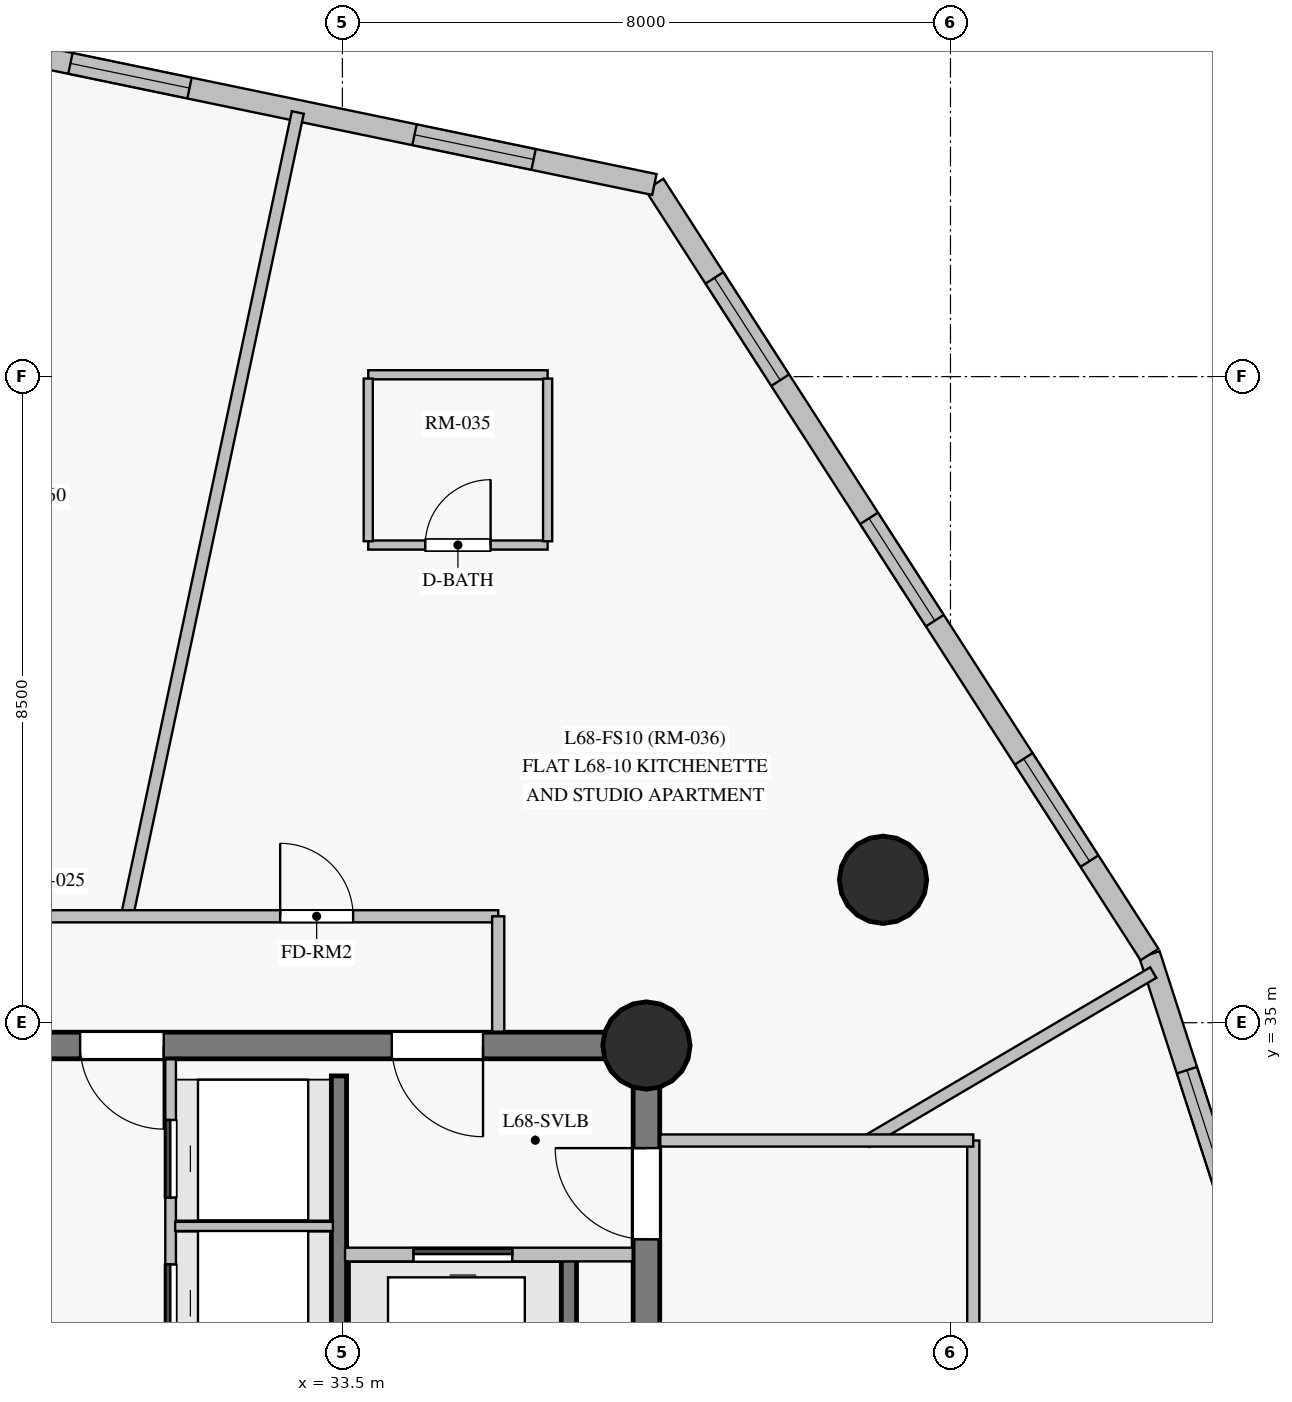
"""IFC4 building model, lengths in metres.
Left out: names, types, materials, properties, quantities, classifications, styles, units other than length and angle.
Written with IfcOpenShell. Run it as: python <this file> out.ifc"""

import sys

from ifc_helpers import new_model, si_unit, direction, frame, frame_2d, origin, origin_with_axes, origin_2d, place, context, subcontext, project, spatial, rectangle, circle, extrude, source, transform, mapped, element, fill, save


model = new_model("IFC4")
c1 = context("Model", 3, precision=1e-05, world=origin(), true_north=direction((0.0, 1.0)))
c2 = subcontext(c1, "Body", "Model", "MODEL_VIEW")
j1 = project(units=[si_unit("LENGTHUNIT", "METRE"), si_unit("PLANEANGLEUNIT", "RADIAN")], contexts=[c1])
p1 = place(None, origin())
s1 = spatial("IfcSite", under=j1, at=p1, CompositionType="ELEMENT")
p2 = place(p1, origin())
s2 = spatial("IfcBuilding", under=s1, at=p2, CompositionType="ELEMENT")
p3 = place(p2, frame((0.0, 0.0, 232.15)))
s3 = spatial("IfcBuildingStorey", under=s2, at=p3, CompositionType="ELEMENT", Elevation=232.15)
p4 = place(p3, frame((37.5, 18.3, 0.0), z_axis=(0.0, 0.0, 1.0), x_axis=(0.0, 1.0, 0.0)))
e1 = element("IfcWall", 1, at=p4, inside=s3, PredefinedType="SHEAR", context=c2, shape_type="SweptSolid", body=[
    extrude(rectangle(XDim=16.4, YDim=0.35, at=frame_2d((8.2, 0.0))), origin(), (0.0, 0.0, 1.0), 2.85),
])
p5 = place(p4, frame((13.85, 0.0, 0.0)))
e2 = element("IfcOpeningElement", 2, at=p5, cuts=e1, PredefinedType="OPENING", context=c2, shape_type="SweptSolid", body=[
    extrude(rectangle(XDim=1.2, YDim=2.15, at=frame_2d((0.6, 1.075))), frame((0.0, 0.185, 0.0), z_axis=(0.0, -1.0, 0.0), x_axis=(1.0, 0.0, 0.0)), (0.0, 0.0, 1.0), 0.37),
])
p6 = place(p3, frame((37.5, 34.7, 0.0), z_axis=(0.0, 0.0, 1.0), x_axis=(-1.0, 0.0, 0.0)))
e3 = element("IfcWall", 3, at=p6, inside=s3, PredefinedType="SHEAR", context=c2, shape_type="SweptSolid", body=[
    extrude(rectangle(XDim=10.95, YDim=0.35, at=frame_2d((5.475, 0.0))), origin(), (0.0, 0.0, 1.0), 2.85),
])
p7 = place(p6, frame((2.15, 0.0, 0.0)))
e4 = element("IfcOpeningElement", 4, at=p7, cuts=e3, PredefinedType="OPENING", context=c2, shape_type="SweptSolid", body=[
    extrude(rectangle(XDim=1.2, YDim=2.15, at=frame_2d((0.6, 1.075))), frame((0.0, 0.185, 0.0), z_axis=(0.0, -1.0, 0.0), x_axis=(1.0, 0.0, 0.0)), (0.0, 0.0, 1.0), 0.37),
])
p8 = place(p6, frame((6.35, 0.0, 0.0)))
e5 = element("IfcOpeningElement", 5, at=p8, cuts=e3, PredefinedType="OPENING", context=c2, shape_type="SweptSolid", body=[
    extrude(rectangle(XDim=1.1, YDim=2.15, at=frame_2d((0.55, 1.075))), frame((0.0, 0.185, 0.0), z_axis=(0.0, -1.0, 0.0), x_axis=(1.0, 0.0, 0.0)), (0.0, 0.0, 1.0), 0.37),
])
m1 = source(origin_with_axes(), c2, "Body", "SweptSolid", [
    extrude(circle(Radius=0.575, at=origin_2d()), origin(), (0.0, 0.0, 1.0), 3.05),
])
for number, where, z_axis, x_axis in (
    (6, (37.5, 34.7, 0.0), (0.0, 0.0, 1.0), (1.0, 0.0, 0.0)),
    (7, (40.613, 36.88, 0.0), (0.0, 0.0, 1.0), (1.0, 0.0, 0.0)),
):
    element("IfcColumn", number, at=place(p3, frame(where, z_axis=z_axis, x_axis=x_axis)), inside=s3, PredefinedType="COLUMN", context=c2, shape_type="MappedRepresentation", body=[
        mapped(m1, transform((0.0, 0.0, 0.0), scale=1.0)),
    ])
p9 = place(p3, frame((46.664, 28.027, 0.0), z_axis=(0.0, 0.0, 1.0), x_axis=(-0.307705547062, 0.951481632144, 0.0)))
e8 = element("IfcWall", 8, at=p9, inside=s3, PredefinedType="SOLIDWALL", context=c2, shape_type="SweptSolid", body=[
    extrude(rectangle(XDim=8.271, YDim=0.28, at=frame_2d((4.136, 0.0))), origin(), (0.0, 0.0, 1.0), 2.85),
])
p10 = place(p9, frame((1.41, 0.0, 0.85)))
e9 = element("IfcOpeningElement", 9, at=p10, cuts=e8, PredefinedType="OPENING", context=c2, shape_type="SweptSolid", body=[
    extrude(rectangle(XDim=1.6, YDim=1.6, at=frame_2d((0.8, 0.8))), frame((0.0, 0.15, 0.0), z_axis=(0.0, -1.0, 0.0), x_axis=(1.0, 0.0, 0.0)), (0.0, 0.0, 1.0), 0.3),
])
p11 = place(p9, frame((5.072, 0.0, 0.85)))
e10 = element("IfcOpeningElement", 10, at=p11, cuts=e8, PredefinedType="OPENING", context=c2, shape_type="SweptSolid", body=[
    extrude(rectangle(XDim=1.6, YDim=1.6, at=frame_2d((0.8, 0.8))), frame((0.0, 0.15, 0.0), z_axis=(0.0, -1.0, 0.0), x_axis=(1.0, 0.0, 0.0)), (0.0, 0.0, 1.0), 0.3),
])
p12 = place(p3, frame((44.118, 35.897, 0.0), z_axis=(0.0, 0.0, 1.0), x_axis=(-0.540866189817, 0.841108652145, 0.0)))
e11 = element("IfcWall", 11, at=p12, inside=s3, PredefinedType="SOLIDWALL", context=c2, shape_type="SweptSolid", body=[
    extrude(rectangle(XDim=12.043, YDim=0.28, at=frame_2d((6.022, 0.0))), origin(), (0.0, 0.0, 1.0), 2.85),
])
p13 = place(p12, frame((1.461, 0.0, 0.85)))
e12 = element("IfcOpeningElement", 12, at=p13, cuts=e11, PredefinedType="OPENING", context=c2, shape_type="SweptSolid", body=[
    extrude(rectangle(XDim=1.6, YDim=1.6, at=frame_2d((0.8, 0.8))), frame((0.0, 0.15, 0.0), z_axis=(0.0, -1.0, 0.0), x_axis=(1.0, 0.0, 0.0)), (0.0, 0.0, 1.0), 0.3),
])
p14 = place(p12, frame((5.222, 0.0, 0.85)))
e13 = element("IfcOpeningElement", 13, at=p14, cuts=e11, PredefinedType="OPENING", context=c2, shape_type="SweptSolid", body=[
    extrude(rectangle(XDim=1.6, YDim=1.6, at=frame_2d((0.8, 0.8))), frame((0.0, 0.15, 0.0), z_axis=(0.0, -1.0, 0.0), x_axis=(1.0, 0.0, 0.0)), (0.0, 0.0, 1.0), 0.3),
])
p15 = place(p12, frame((8.983, 0.0, 0.85)))
e14 = element("IfcOpeningElement", 14, at=p15, cuts=e11, PredefinedType="OPENING", context=c2, shape_type="SweptSolid", body=[
    extrude(rectangle(XDim=1.6, YDim=1.6, at=frame_2d((0.8, 0.8))), frame((0.0, 0.15, 0.0), z_axis=(0.0, -1.0, 0.0), x_axis=(1.0, 0.0, 0.0)), (0.0, 0.0, 1.0), 0.3),
])
p16 = place(p3, frame((37.604, 46.027, 0.0), z_axis=(0.0, 0.0, 1.0), x_axis=(-0.979153110394, 0.203123574224, 0.0)))
e15 = element("IfcWall", 15, at=p16, inside=s3, PredefinedType="SOLIDWALL", context=c2, shape_type="SweptSolid", body=[
    extrude(rectangle(XDim=9.367, YDim=0.28, at=frame_2d((4.683, 0.0))), origin(), (0.0, 0.0, 1.0), 2.85),
])
p17 = place(p16, frame((1.623, 0.0, 0.85)))
e16 = element("IfcOpeningElement", 16, at=p17, cuts=e15, PredefinedType="OPENING", context=c2, shape_type="SweptSolid", body=[
    extrude(rectangle(XDim=1.6, YDim=1.6, at=frame_2d((0.8, 0.8))), frame((0.0, 0.15, 0.0), z_axis=(0.0, -1.0, 0.0), x_axis=(1.0, 0.0, 0.0)), (0.0, 0.0, 1.0), 0.3),
])
p18 = place(p16, frame((6.246, 0.0, 0.85)))
e17 = element("IfcOpeningElement", 17, at=p18, cuts=e15, PredefinedType="OPENING", context=c2, shape_type="SweptSolid", body=[
    extrude(rectangle(XDim=1.6, YDim=1.6, at=frame_2d((0.8, 0.8))), frame((0.0, 0.15, 0.0), z_axis=(0.0, -1.0, 0.0), x_axis=(1.0, 0.0, 0.0)), (0.0, 0.0, 1.0), 0.3),
])
p19 = place(p3, frame((33.455, 18.7, 0.0), z_axis=(0.0, 0.0, 1.0), x_axis=(0.0, 1.0, 0.0)))
e18 = element("IfcWall", 18, at=p19, inside=s3, PredefinedType="SHEAR", context=c2, shape_type="SweptSolid", body=[
    extrude(rectangle(XDim=15.6, YDim=0.2, at=frame_2d((7.8, 0.0))), origin(), (0.0, 0.0, 1.0), 2.85),
])
p20 = place(p19, frame((2.75, 0.0, 0.0)))
e19 = element("IfcOpeningElement", 19, at=p20, cuts=e18, PredefinedType="OPENING", context=c2, shape_type="SweptSolid", body=[
    extrude(rectangle(XDim=1.15, YDim=2.15, at=frame_2d((0.575, 1.075))), frame((0.0, 0.11, 0.0), z_axis=(0.0, -1.0, 0.0), x_axis=(1.0, 0.0, 0.0)), (0.0, 0.0, 1.0), 0.22),
])
p21 = place(p19, frame((0.55, 0.0, 0.0)))
e20 = element("IfcOpeningElement", 20, at=p21, cuts=e18, PredefinedType="OPENING", context=c2, shape_type="SweptSolid", body=[
    extrude(rectangle(XDim=0.94, YDim=2.1, at=frame_2d((0.47, 1.05))), frame((0.0, 0.11, 0.0), z_axis=(0.0, -1.0, 0.0), x_axis=(1.0, 0.0, 0.0)), (0.0, 0.0, 1.0), 0.22),
])
p22 = place(p3, frame((36.48, 29.02, 0.0), z_axis=(0.0, 0.0, 1.0), x_axis=(0.0, 1.0, 0.0)))
e21 = element("IfcWall", 21, at=p22, inside=s3, PredefinedType="SHEAR", context=c2, shape_type="SweptSolid", body=[
    extrude(rectangle(XDim=2.86, YDim=0.2, at=frame_2d((1.43, 0.0))), origin(), (0.0, 0.0, 1.0), 2.85),
])
p23 = place(p3, frame((41.8, 33.45, 0.0), z_axis=(0.0, 0.0, 1.0), x_axis=(0.0, -1.0, 0.0)))
e22 = element("IfcWall", 22, at=p23, inside=s3, PredefinedType="PARTITIONING", context=c2, shape_type="SweptSolid", body=[
    extrude(rectangle(XDim=17.433, YDim=0.16, at=frame_2d((8.717, 0.0))), origin(), (0.0, 0.0, 1.0), 2.3),
])
p24 = place(p23, frame((10.75, 0.0, 0.0)))
e23 = element("IfcOpeningElement", 23, at=p24, cuts=e22, PredefinedType="OPENING", context=c2, shape_type="SweptSolid", body=[
    extrude(rectangle(XDim=0.96, YDim=2.15, at=frame_2d((0.48, 1.075))), frame((0.0, 0.09, 0.0), z_axis=(0.0, -1.0, 0.0), x_axis=(1.0, 0.0, 0.0)), (0.0, 0.0, 1.0), 0.18),
])
p25 = place(p23, frame((7.77, 0.0, 0.0)))
e24 = element("IfcOpeningElement", 24, at=p25, cuts=e22, PredefinedType="OPENING", context=c2, shape_type="SweptSolid", body=[
    extrude(rectangle(XDim=0.96, YDim=2.15, at=frame_2d((0.48, 1.075))), frame((0.0, 0.09, 0.0), z_axis=(0.0, -1.0, 0.0), x_axis=(1.0, 0.0, 0.0)), (0.0, 0.0, 1.0), 0.18),
])
p26 = place(p23, frame((6.333, 0.0, 0.0)))
e25 = element("IfcOpeningElement", 25, at=p26, cuts=e22, PredefinedType="OPENING", context=c2, shape_type="SweptSolid", body=[
    extrude(rectangle(XDim=0.96, YDim=2.15, at=frame_2d((0.48, 1.075))), frame((0.0, 0.09, 0.0), z_axis=(0.0, -1.0, 0.0), x_axis=(1.0, 0.0, 0.0)), (0.0, 0.0, 1.0), 0.18),
])
p27 = place(p23, frame((3.231, 0.0, 0.0)))
e26 = element("IfcOpeningElement", 26, at=p27, cuts=e22, PredefinedType="OPENING", context=c2, shape_type="SweptSolid", body=[
    extrude(rectangle(XDim=0.86, YDim=2.04, at=frame_2d((0.43, 1.02))), frame((0.0, 0.09, 0.0), z_axis=(0.0, -1.0, 0.0), x_axis=(1.0, 0.0, 0.0)), (0.0, 0.0, 1.0), 0.18),
])
p28 = place(p3, frame((30.659, 36.371, 0.0), z_axis=(0.0, 0.0, 1.0), x_axis=(0.207907775763, 0.978148432896, 0.0)))
e27 = element("IfcWall", 27, at=p28, inside=s3, PredefinedType="PARTITIONING", context=c2, shape_type="SweptSolid", body=[
    extrude(rectangle(XDim=10.841, YDim=0.16, at=frame_2d((5.42, 0.0))), origin(), (0.0, 0.0, 1.0), 2.85),
])
p29 = place(p3, frame((28.6, 36.4, 0.0), z_axis=(0.0, 0.0, 1.0), x_axis=(1.0, 0.0, 0.0)))
e28 = element("IfcWall", 28, at=p29, inside=s3, PredefinedType="PARTITIONING", context=c2, shape_type="SweptSolid", body=[
    extrude(rectangle(XDim=6.95, YDim=0.16, at=frame_2d((3.475, 0.0))), origin(), (0.0, 0.0, 1.0), 2.45),
])
p30 = place(p29, frame((4.081, 0.0, 0.0)))
e29 = element("IfcOpeningElement", 29, at=p30, cuts=e28, PredefinedType="OPENING", context=c2, shape_type="SweptSolid", body=[
    extrude(rectangle(XDim=0.96, YDim=2.15, at=frame_2d((0.48, 1.075))), frame((0.0, 0.09, 0.0), z_axis=(0.0, -1.0, 0.0), x_axis=(1.0, 0.0, 0.0)), (0.0, 0.0, 1.0), 0.18),
])
p31 = place(p3, frame((40.391, 33.435, 0.0), z_axis=(0.0, 0.0, 1.0), x_axis=(0.861637645298, 0.507523958257, 0.0)))
e30 = element("IfcWall", 30, at=p31, inside=s3, PredefinedType="PARTITIONING", context=c2, shape_type="SweptSolid", body=[
    extrude(rectangle(XDim=4.383, YDim=0.16, at=frame_2d((2.191, 0.0))), origin(), (0.0, 0.0, 1.0), 2.85),
])
p32 = place(p3, frame((37.682, 33.45, 0.0), z_axis=(0.0, 0.0, 1.0), x_axis=(1.0, 0.0, 0.0)))
e31 = element("IfcWall", 31, at=p32, inside=s3, PredefinedType="PARTITIONING", context=c2, shape_type="SweptSolid", body=[
    extrude(rectangle(XDim=4.118, YDim=0.16, at=frame_2d((2.059, 0.0))), origin(), (0.0, 0.0, 1.0), 2.85),
])
p33 = place(p3, frame((31.24, 30.45, 0.0), z_axis=(0.0, 0.0, 1.0), x_axis=(0.0, 1.0, 0.0)))
e32 = element("IfcWall", 32, at=p33, inside=s3, PredefinedType="PARTITIONING", context=c2, shape_type="SweptSolid", body=[
    extrude(rectangle(XDim=4.068, YDim=0.14, at=frame_2d((2.034, 0.0))), origin(), (0.0, 0.0, 1.0), 2.85),
])
p34 = place(p33, frame((0.35, 0.0, 0.0)))
e33 = element("IfcOpeningElement", 33, at=p34, cuts=e32, PredefinedType="OPENING", context=c2, shape_type="SweptSolid", body=[
    extrude(rectangle(XDim=1.02, YDim=2.15, at=frame_2d((0.51, 1.075))), frame((0.0, 0.08, 0.0), z_axis=(0.0, -1.0, 0.0), x_axis=(1.0, 0.0, 0.0)), (0.0, 0.0, 1.0), 0.16),
])
p35 = place(p33, frame((2.25, 0.0, 0.0)))
e34 = element("IfcOpeningElement", 34, at=p35, cuts=e32, PredefinedType="OPENING", context=c2, shape_type="SweptSolid", body=[
    extrude(rectangle(XDim=1.02, YDim=2.15, at=frame_2d((0.51, 1.075))), frame((0.0, 0.08, 0.0), z_axis=(0.0, -1.0, 0.0), x_axis=(1.0, 0.0, 0.0)), (0.0, 0.0, 1.0), 0.16),
])
p36 = place(p3, frame((33.535, 31.95, 0.0), z_axis=(0.0, 0.0, 1.0), x_axis=(1.0, 0.0, 0.0)))
e35 = element("IfcWall", 35, at=p36, inside=s3, PredefinedType="PARTITIONING", context=c2, shape_type="SweptSolid", body=[
    extrude(rectangle(XDim=3.784, YDim=0.18, at=frame_2d((1.892, 0.0))), origin(), (0.0, 0.0, 1.0), 2.85),
])
p37 = place(p36, frame((0.9, 0.0, 0.0)))
e36 = element("IfcOpeningElement", 36, at=p37, cuts=e35, PredefinedType="OPENING", context=c2, shape_type="SweptSolid", body=[
    extrude(rectangle(XDim=1.3, YDim=2.2, at=frame_2d((0.65, 1.1))), frame((0.0, 0.1, 0.0), z_axis=(0.0, -1.0, 0.0), x_axis=(1.0, 0.0, 0.0)), (0.0, 0.0, 1.0), 0.2),
])
p38 = place(p3, frame((33.84, 41.284, 0.0), z_axis=(0.0, 0.0, 1.0), x_axis=(1.0, 0.0, 0.0)))
e37 = element("IfcWall", 37, at=p38, inside=s3, PredefinedType="PARTITIONING", context=c2, shape_type="SweptSolid", body=[
    extrude(rectangle(XDim=2.36, YDim=0.12, at=frame_2d((1.18, 0.0))), origin(), (0.0, 0.0, 1.0), 2.85),
])
p39 = place(p38, frame((0.75, 0.0, 0.0)))
e38 = element("IfcOpeningElement", 38, at=p39, cuts=e37, PredefinedType="OPENING", context=c2, shape_type="SweptSolid", body=[
    extrude(rectangle(XDim=0.86, YDim=2.1, at=frame_2d((0.43, 1.05))), frame((0.0, 0.07, 0.0), z_axis=(0.0, -1.0, 0.0), x_axis=(1.0, 0.0, 0.0)), (0.0, 0.0, 1.0), 0.14),
])
p40 = place(p3, frame((36.2, 43.524, 0.0), z_axis=(0.0, 0.0, 1.0), x_axis=(-1.0, 0.0, 0.0)))
e39 = element("IfcWall", 39, at=p40, inside=s3, PredefinedType="PARTITIONING", context=c2, shape_type="SweptSolid", body=[
    extrude(rectangle(XDim=2.36, YDim=0.12, at=frame_2d((1.18, 0.0))), origin(), (0.0, 0.0, 1.0), 2.85),
])
for number, where, z_axis, x_axis in (
    (40, (36.2, 41.334, 0.0), (0.0, 0.0, 1.0), (0.0, 1.0, 0.0)),
    (41, (33.84, 43.474, 0.0), (0.0, 0.0, 1.0), (0.0, -1.0, 0.0)),
):
    element("IfcWall", number, at=place(p3, frame(where, z_axis=z_axis, x_axis=x_axis)), inside=s3, PredefinedType="PARTITIONING", context=c2, shape_type="SweptSolid", body=[
        extrude(rectangle(XDim=2.14, YDim=0.12, at=frame_2d((1.07, 0.0))), origin(), (0.0, 0.0, 1.0), 2.85),
    ])
p41 = place(p3, frame((31.3, 32.32, 0.0), z_axis=(0.0, 0.0, 1.0), x_axis=(1.0, 0.0, 0.0)))
e42 = element("IfcWall", 42, at=p41, inside=s3, PredefinedType="PARTITIONING", context=c2, shape_type="SweptSolid", body=[
    extrude(rectangle(XDim=2.075, YDim=0.12, at=frame_2d((1.038, 0.0))), origin(), (0.0, 0.0, 1.0), 2.85),
])
p42 = place(p3, frame((35.55, 36.4, 0.0), z_axis=(0.0, 0.0, 1.0), x_axis=(0.0, -1.0, 0.0)))
e43 = element("IfcWall", 43, at=p42, inside=s3, PredefinedType="PARTITIONING", context=c2, shape_type="SweptSolid", body=[
    extrude(rectangle(XDim=1.518, YDim=0.16, at=frame_2d((0.759, 0.0))), origin(), (0.0, 0.0, 1.0), 2.85),
])
m2 = source(origin_with_axes(), c2, "Body", "SweptSolid", [
    extrude(rectangle(XDim=1.6, YDim=1.6, at=frame_2d((0.8, 0.8))), frame((0.0, 0.03, 0.0), z_axis=(0.0, -1.0, 0.0), x_axis=(1.0, 0.0, 0.0)), (0.0, 0.0, 1.0), 0.06),
])
p43 = place(p11, origin())
e44 = element("IfcWindow", 44, at=p43, inside=s3, PartitioningType="SINGLE_PANEL", PredefinedType="WINDOW", context=c2, shape_type="MappedRepresentation", body=[
    mapped(m2, transform((0.0, 0.0, 0.0), scale=1.0)),
])
fill(e10, e44)
p44 = place(p13, origin())
e45 = element("IfcWindow", 45, at=p44, inside=s3, PartitioningType="SINGLE_PANEL", PredefinedType="WINDOW", context=c2, shape_type="MappedRepresentation", body=[
    mapped(m2, transform((0.0, 0.0, 0.0), scale=1.0)),
])
fill(e12, e45)
p45 = place(p14, origin())
e46 = element("IfcWindow", 46, at=p45, inside=s3, PartitioningType="SINGLE_PANEL", PredefinedType="WINDOW", context=c2, shape_type="MappedRepresentation", body=[
    mapped(m2, transform((0.0, 0.0, 0.0), scale=1.0)),
])
fill(e13, e46)
p46 = place(p15, origin())
e47 = element("IfcWindow", 47, at=p46, inside=s3, PartitioningType="SINGLE_PANEL", PredefinedType="WINDOW", context=c2, shape_type="MappedRepresentation", body=[
    mapped(m2, transform((0.0, 0.0, 0.0), scale=1.0)),
])
fill(e14, e47)
p47 = place(p17, origin())
e48 = element("IfcWindow", 48, at=p47, inside=s3, PartitioningType="SINGLE_PANEL", PredefinedType="WINDOW", context=c2, shape_type="MappedRepresentation", body=[
    mapped(m2, transform((0.0, 0.0, 0.0), scale=1.0)),
])
fill(e16, e48)
p48 = place(p18, origin())
e49 = element("IfcWindow", 49, at=p48, inside=s3, PartitioningType="SINGLE_PANEL", PredefinedType="WINDOW", context=c2, shape_type="MappedRepresentation", body=[
    mapped(m2, transform((0.0, 0.0, 0.0), scale=1.0)),
])
fill(e17, e49)
m3 = source(origin_with_axes(), c2, "Body", "SweptSolid", [
    extrude(rectangle(XDim=1.2, YDim=2.15, at=frame_2d((0.6, 1.075))), frame((0.0, 0.025, 0.0), z_axis=(0.0, -1.0, 0.0), x_axis=(1.0, 0.0, 0.0)), (0.0, 0.0, 1.0), 0.05),
])
p49 = place(p5, origin())
e50 = element("IfcDoor", 50, at=p49, inside=s3, OperationType="SINGLE_SWING_RIGHT", PredefinedType="DOOR", context=c2, shape_type="MappedRepresentation", body=[
    mapped(m3, transform((0.0, 0.0, 0.0), scale=1.0)),
])
fill(e2, e50)
p50 = place(p7, origin())
e51 = element("IfcDoor", 51, at=p50, inside=s3, OperationType="SINGLE_SWING_LEFT", PredefinedType="DOOR", context=c2, shape_type="MappedRepresentation", body=[
    mapped(m3, transform((0.0, 0.0, 0.0), scale=1.0)),
])
fill(e4, e51)
m4 = source(origin_with_axes(), c2, "Body", "SweptSolid", [
    extrude(rectangle(XDim=1.3, YDim=2.2, at=frame_2d((0.65, 1.1))), frame((0.0, 0.025, 0.0), z_axis=(0.0, -1.0, 0.0), x_axis=(1.0, 0.0, 0.0)), (0.0, 0.0, 1.0), 0.05),
])
p51 = place(p37, origin())
e52 = element("IfcDoor", 52, at=p51, inside=s3, OperationType="SLIDING_TO_LEFT", PredefinedType="DOOR", context=c2, shape_type="MappedRepresentation", body=[
    mapped(m4, transform((0.0, 0.0, 0.0), scale=1.0)),
])
fill(e36, e52)
m5 = source(origin_with_axes(), c2, "Body", "SweptSolid", [
    extrude(rectangle(XDim=1.1, YDim=2.15, at=frame_2d((0.55, 1.075))), frame((0.0, 0.025, 0.0), z_axis=(0.0, -1.0, 0.0), x_axis=(1.0, 0.0, 0.0)), (0.0, 0.0, 1.0), 0.05),
])
p52 = place(p8, origin())
e53 = element("IfcDoor", 53, at=p52, inside=s3, OperationType="SINGLE_SWING_LEFT", PredefinedType="DOOR", context=c2, shape_type="MappedRepresentation", body=[
    mapped(m5, transform((0.0, 0.0, 0.0), scale=1.0)),
])
fill(e5, e53)
m6 = source(origin_with_axes(), c2, "Body", "SweptSolid", [
    extrude(rectangle(XDim=1.02, YDim=2.15, at=frame_2d((0.51, 1.075))), frame((0.0, 0.025, 0.0), z_axis=(0.0, -1.0, 0.0), x_axis=(1.0, 0.0, 0.0)), (0.0, 0.0, 1.0), 0.05),
])
p53 = place(p34, origin())
e54 = element("IfcDoor", 54, at=p53, inside=s3, OperationType="SLIDING_TO_LEFT", PredefinedType="DOOR", context=c2, shape_type="MappedRepresentation", body=[
    mapped(m6, transform((0.0, 0.0, 0.0), scale=1.0)),
])
fill(e33, e54)
p54 = place(p35, origin())
e55 = element("IfcDoor", 55, at=p54, inside=s3, OperationType="SLIDING_TO_LEFT", PredefinedType="DOOR", context=c2, shape_type="MappedRepresentation", body=[
    mapped(m6, transform((0.0, 0.0, 0.0), scale=1.0)),
])
fill(e34, e55)
m7 = source(origin_with_axes(), c2, "Body", "SweptSolid", [
    extrude(rectangle(XDim=0.86, YDim=2.1, at=frame_2d((0.43, 1.05))), frame((0.0, 0.025, 0.0), z_axis=(0.0, -1.0, 0.0), x_axis=(1.0, 0.0, 0.0)), (0.0, 0.0, 1.0), 0.05),
])
p55 = place(p39, origin())
e56 = element("IfcDoor", 56, at=p55, inside=s3, OperationType="SINGLE_SWING_RIGHT", PredefinedType="DOOR", context=c2, shape_type="MappedRepresentation", body=[
    mapped(m7, transform((0.0, 0.0, 0.0), scale=1.0)),
])
fill(e38, e56)
m8 = source(origin_with_axes(), c2, "Body", "SweptSolid", [
    extrude(rectangle(XDim=0.96, YDim=2.15, at=frame_2d((0.48, 1.075))), frame((0.0, 0.025, 0.0), z_axis=(0.0, -1.0, 0.0), x_axis=(1.0, 0.0, 0.0)), (0.0, 0.0, 1.0), 0.05),
])
p56 = place(p30, origin())
e57 = element("IfcDoor", 57, at=p56, inside=s3, OperationType="SINGLE_SWING_LEFT", PredefinedType="DOOR", context=c2, shape_type="MappedRepresentation", body=[
    mapped(m8, transform((0.0, 0.0, 0.0), scale=1.0)),
])
fill(e29, e57)
save(model, sys.argv[1])
